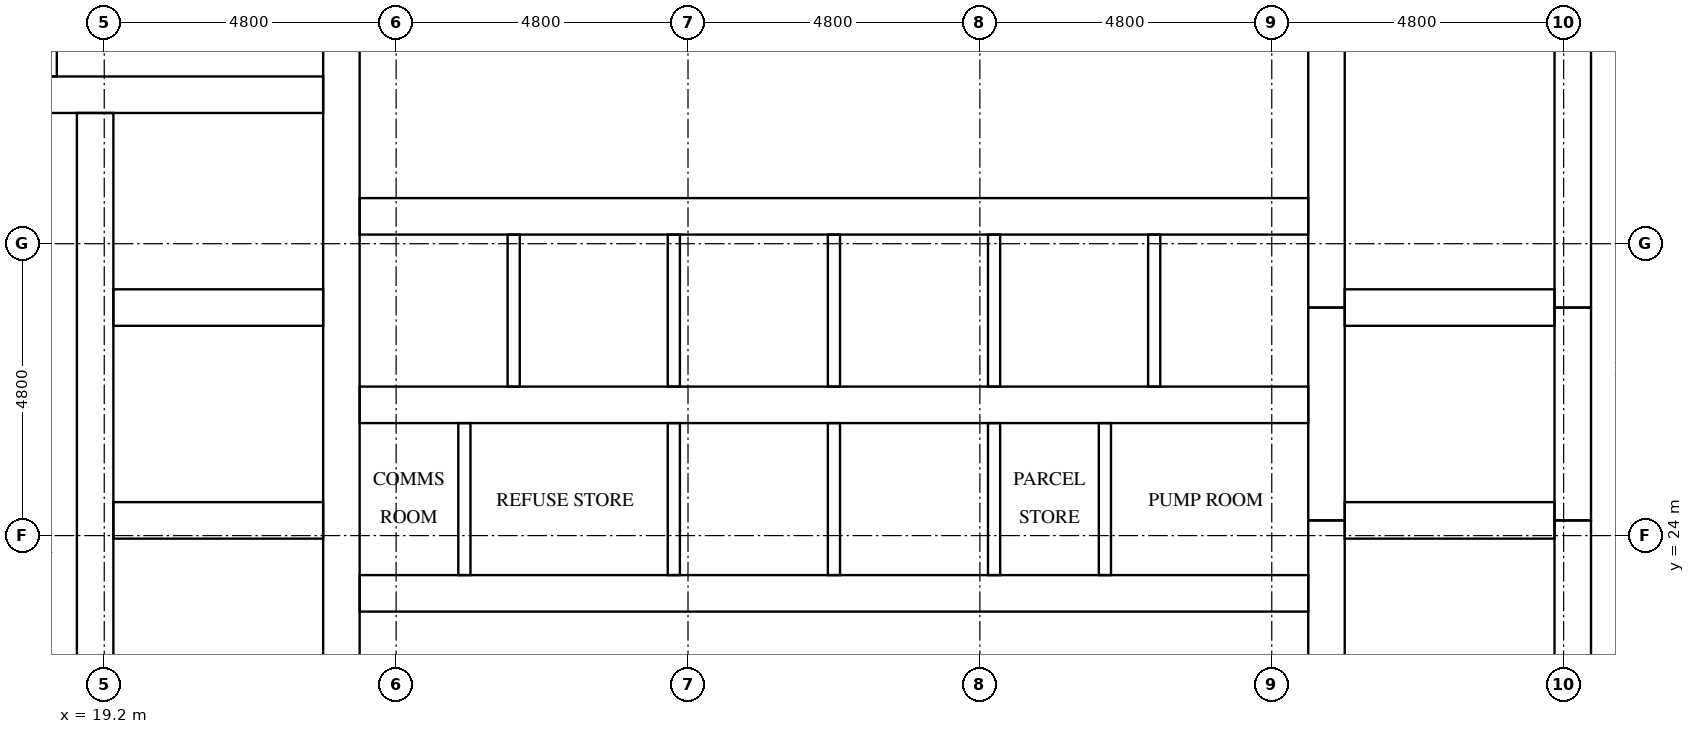
"""IFC4 building model, lengths in metres.
Left out: names, types, materials, properties, quantities, classifications, styles, units other than length and angle.
Written with IfcOpenShell. Run it as: python <this file> out.ifc"""

import sys

from ifc_helpers import new_model, si_unit, direction, frame, frame_2d, origin, place, context, subcontext, project, spatial, rectangle, extrude, element, fill, save


model = new_model("IFC4")
c1 = context("Model", 3, precision=1e-05, world=origin(), true_north=direction((0.0, 1.0)))
c2 = subcontext(c1, "Body", "Model", "MODEL_VIEW")
j1 = project(units=[si_unit("LENGTHUNIT", "METRE"), si_unit("PLANEANGLEUNIT", "RADIAN")], contexts=[c1])
p1 = place(None, origin())
s1 = spatial("IfcSite", under=j1, at=p1, CompositionType="ELEMENT")
p2 = place(p1, origin())
s2 = spatial("IfcBuilding", under=s1, at=p2, CompositionType="ELEMENT")
p3 = place(p2, frame((0.0, 0.0, 166.5)))
s3 = spatial("IfcBuildingStorey", under=s2, at=p3, CompositionType="ELEMENT", Elevation=166.5)
p4 = place(p3, frame((19.05, 15.8, 0.0), z_axis=(0.0, 0.0, 1.0), x_axis=(0.0, 1.0, 0.0)))
e1 = element("IfcWall", 1, at=p4, inside=s3, PredefinedType="SHEAR", context=c2, shape_type="SweptSolid", body=[
    extrude(rectangle(XDim=15.15, YDim=0.6, at=frame_2d((7.575, 0.0))), origin(), (0.0, 0.0, 1.0), 3.2),
])
p5 = place(p4, frame((9.65, 0.0, 0.0)))
e2 = element("IfcOpeningElement", 2, at=p5, cuts=e1, PredefinedType="OPENING", context=c2, shape_type="SweptSolid", body=[
    extrude(rectangle(XDim=1.1, YDim=2.1, at=frame_2d((0.55, 1.05))), frame((0.0, 0.31, 0.0), z_axis=(0.0, -1.0, 0.0), x_axis=(1.0, 0.0, 0.0)), (0.0, 0.0, 1.0), 0.62),
])
p6 = place(p4, frame((13.15, 0.0, 0.0)))
e3 = element("IfcOpeningElement", 3, at=p6, cuts=e1, PredefinedType="OPENING", context=c2, shape_type="SweptSolid", body=[
    extrude(rectangle(XDim=1.1, YDim=2.1, at=frame_2d((0.55, 1.05))), frame((0.0, 0.31, 0.0), z_axis=(0.0, -1.0, 0.0), x_axis=(1.0, 0.0, 0.0)), (0.0, 0.0, 1.0), 0.62),
])
p7 = place(p4, frame((0.4, 0.0, 0.0)))
e4 = element("IfcOpeningElement", 4, at=p7, cuts=e1, PredefinedType="OPENING", context=c2, shape_type="SweptSolid", body=[
    extrude(rectangle(XDim=1.2, YDim=2.1, at=frame_2d((0.6, 1.05))), frame((0.0, 0.31, 0.0), z_axis=(0.0, -1.0, 0.0), x_axis=(1.0, 0.0, 0.0)), (0.0, 0.0, 1.0), 0.62),
])
p8 = place(p3, frame((23.1, 15.8, 0.0), z_axis=(0.0, 0.0, 1.0), x_axis=(0.0, 1.0, 0.0)))
e5 = element("IfcWall", 5, at=p8, inside=s3, PredefinedType="SHEAR", context=c2, shape_type="SweptSolid", body=[
    extrude(rectangle(XDim=21.2, YDim=0.6, at=frame_2d((10.6, 0.0))), origin(), (0.0, 0.0, 1.0), 3.2),
])
p9 = place(p3, frame((39.3, 15.8, 0.0), z_axis=(0.0, 0.0, 1.0), x_axis=(0.0, 1.0, 0.0)))
e6 = element("IfcWall", 6, at=p9, inside=s3, PredefinedType="SHEAR", context=c2, shape_type="SweptSolid", body=[
    extrude(rectangle(XDim=8.45, YDim=0.6, at=frame_2d((4.225, 0.0))), origin(), (0.0, 0.0, 1.0), 3.2),
])
p10 = place(p3, frame((39.3, 24.25, 0.0), z_axis=(0.0, 0.0, 1.0), x_axis=(0.0, 1.0, 0.0)))
e7 = element("IfcWall", 7, at=p10, inside=s3, PredefinedType="SHEAR", context=c2, shape_type="SweptSolid", body=[
    extrude(rectangle(XDim=3.5, YDim=0.6, at=frame_2d((1.75, 0.0))), origin(), (0.0, 0.0, 1.0), 3.2),
])
p11 = place(p3, frame((39.3, 27.75, 0.0), z_axis=(0.0, 0.0, 1.0), x_axis=(0.0, 1.0, 0.0)))
e8 = element("IfcWall", 8, at=p11, inside=s3, PredefinedType="SHEAR", context=c2, shape_type="SweptSolid", body=[
    extrude(rectangle(XDim=9.25, YDim=0.6, at=frame_2d((4.625, 0.0))), origin(), (0.0, 0.0, 1.0), 3.2),
])
p12 = place(p3, frame((43.35, 15.8, 0.0), z_axis=(0.0, 0.0, 1.0), x_axis=(0.0, 1.0, 0.0)))
e9 = element("IfcWall", 9, at=p12, inside=s3, PredefinedType="SHEAR", context=c2, shape_type="SweptSolid", body=[
    extrude(rectangle(XDim=8.45, YDim=0.6, at=frame_2d((4.225, 0.0))), origin(), (0.0, 0.0, 1.0), 3.2),
])
p13 = place(p12, frame((0.4, 0.0, 0.0)))
e10 = element("IfcOpeningElement", 10, at=p13, cuts=e9, PredefinedType="OPENING", context=c2, shape_type="SweptSolid", body=[
    extrude(rectangle(XDim=1.2, YDim=2.1, at=frame_2d((0.6, 1.05))), frame((0.0, 0.31, 0.0), z_axis=(0.0, -1.0, 0.0), x_axis=(1.0, 0.0, 0.0)), (0.0, 0.0, 1.0), 0.62),
])
p14 = place(p3, frame((43.35, 24.25, 0.0), z_axis=(0.0, 0.0, 1.0), x_axis=(0.0, 1.0, 0.0)))
e11 = element("IfcWall", 11, at=p14, inside=s3, PredefinedType="SHEAR", context=c2, shape_type="SweptSolid", body=[
    extrude(rectangle(XDim=3.5, YDim=0.6, at=frame_2d((1.75, 0.0))), origin(), (0.0, 0.0, 1.0), 3.2),
])
p15 = place(p14, frame((1.2, 0.0, 0.0)))
e12 = element("IfcOpeningElement", 12, at=p15, cuts=e11, PredefinedType="OPENING", context=c2, shape_type="SweptSolid", body=[
    extrude(rectangle(XDim=1.1, YDim=2.1, at=frame_2d((0.55, 1.05))), frame((0.0, 0.31, 0.0), z_axis=(0.0, -1.0, 0.0), x_axis=(1.0, 0.0, 0.0)), (0.0, 0.0, 1.0), 0.62),
])
p16 = place(p3, frame((43.35, 27.75, 0.0), z_axis=(0.0, 0.0, 1.0), x_axis=(0.0, 1.0, 0.0)))
e13 = element("IfcWall", 13, at=p16, inside=s3, PredefinedType="SHEAR", context=c2, shape_type="SweptSolid", body=[
    extrude(rectangle(XDim=9.25, YDim=0.6, at=frame_2d((4.625, 0.0))), origin(), (0.0, 0.0, 1.0), 3.2),
])
p17 = place(p16, frame((7.65, 0.0, 0.0)))
e14 = element("IfcOpeningElement", 14, at=p17, cuts=e13, PredefinedType="OPENING", context=c2, shape_type="SweptSolid", body=[
    extrude(rectangle(XDim=1.2, YDim=2.1, at=frame_2d((0.6, 1.05))), frame((0.0, 0.31, 0.0), z_axis=(0.0, -1.0, 0.0), x_axis=(1.0, 0.0, 0.0)), (0.0, 0.0, 1.0), 0.62),
])
for number, where, z_axis, x_axis in (
    (15, (19.35, 24.25, 0.0), (0.0, 0.0, 1.0), (1.0, 0.0, 0.0)),
    (16, (19.35, 27.75, 0.0), (0.0, 0.0, 1.0), (1.0, 0.0, 0.0)),
):
    element("IfcWall", number, at=place(p3, frame(where, z_axis=z_axis, x_axis=x_axis)), inside=s3, PredefinedType="SHEAR", context=c2, shape_type="SweptSolid", body=[
        extrude(rectangle(XDim=3.45, YDim=0.6, at=frame_2d((1.725, 0.0))), origin(), (0.0, 0.0, 1.0), 3.2),
    ])
p18 = place(p3, frame((15.8, 31.25, 0.0), z_axis=(0.0, 0.0, 1.0), x_axis=(1.0, 0.0, 0.0)))
e17 = element("IfcWall", 17, at=p18, inside=s3, PredefinedType="SHEAR", context=c2, shape_type="SweptSolid", body=[
    extrude(rectangle(XDim=7.0, YDim=0.6, at=frame_2d((3.5, 0.0))), origin(), (0.0, 0.0, 1.0), 3.2),
])
for number, where, z_axis, x_axis in (
    (18, (39.6, 24.25, 0.0), (0.0, 0.0, 1.0), (1.0, 0.0, 0.0)),
    (19, (39.6, 27.75, 0.0), (0.0, 0.0, 1.0), (1.0, 0.0, 0.0)),
):
    element("IfcWall", number, at=place(p3, frame(where, z_axis=z_axis, x_axis=x_axis)), inside=s3, PredefinedType="SHEAR", context=c2, shape_type="SweptSolid", body=[
        extrude(rectangle(XDim=3.45, YDim=0.6, at=frame_2d((1.725, 0.0))), origin(), (0.0, 0.0, 1.0), 3.2),
    ])
p19 = place(p3, frame((23.4, 23.05, 0.0), z_axis=(0.0, 0.0, 1.0), x_axis=(1.0, 0.0, 0.0)))
e20 = element("IfcWall", 20, at=p19, inside=s3, PredefinedType="SHEAR", context=c2, shape_type="SweptSolid", body=[
    extrude(rectangle(XDim=15.6, YDim=0.6, at=frame_2d((7.8, 0.0))), origin(), (0.0, 0.0, 1.0), 3.2),
])
p20 = place(p19, frame((0.311, 0.0, 0.0)))
e21 = element("IfcOpeningElement", 21, at=p20, cuts=e20, PredefinedType="OPENING", context=c2, shape_type="SweptSolid", body=[
    extrude(rectangle(XDim=1.0, YDim=2.1, at=frame_2d((0.5, 1.05))), frame((0.0, 0.31, 0.0), z_axis=(0.0, -1.0, 0.0), x_axis=(1.0, 0.0, 0.0)), (0.0, 0.0, 1.0), 0.62),
])
p21 = place(p19, frame((2.945, 0.0, 0.0)))
e22 = element("IfcOpeningElement", 22, at=p21, cuts=e20, PredefinedType="OPENING", context=c2, shape_type="SweptSolid", body=[
    extrude(rectangle(XDim=1.0, YDim=2.1, at=frame_2d((0.5, 1.05))), frame((0.0, 0.31, 0.0), z_axis=(0.0, -1.0, 0.0), x_axis=(1.0, 0.0, 0.0)), (0.0, 0.0, 1.0), 0.62),
])
p22 = place(p19, frame((10.845, 0.0, 0.0)))
e23 = element("IfcOpeningElement", 23, at=p22, cuts=e20, PredefinedType="OPENING", context=c2, shape_type="SweptSolid", body=[
    extrude(rectangle(XDim=1.0, YDim=2.1, at=frame_2d((0.5, 1.05))), frame((0.0, 0.31, 0.0), z_axis=(0.0, -1.0, 0.0), x_axis=(1.0, 0.0, 0.0)), (0.0, 0.0, 1.0), 0.62),
])
p23 = place(p19, frame((13.478, 0.0, 0.0)))
e24 = element("IfcOpeningElement", 24, at=p23, cuts=e20, PredefinedType="OPENING", context=c2, shape_type="SweptSolid", body=[
    extrude(rectangle(XDim=1.0, YDim=2.1, at=frame_2d((0.5, 1.05))), frame((0.0, 0.31, 0.0), z_axis=(0.0, -1.0, 0.0), x_axis=(1.0, 0.0, 0.0)), (0.0, 0.0, 1.0), 0.62),
])
p24 = place(p3, frame((23.4, 26.15, 0.0), z_axis=(0.0, 0.0, 1.0), x_axis=(1.0, 0.0, 0.0)))
e25 = element("IfcWall", 25, at=p24, inside=s3, PredefinedType="SHEAR", context=c2, shape_type="SweptSolid", body=[
    extrude(rectangle(XDim=15.6, YDim=0.6, at=frame_2d((7.8, 0.0))), origin(), (0.0, 0.0, 1.0), 3.2),
])
p25 = place(p3, frame((23.4, 29.25, 0.0), z_axis=(0.0, 0.0, 1.0), x_axis=(1.0, 0.0, 0.0)))
e26 = element("IfcWall", 26, at=p25, inside=s3, PredefinedType="SHEAR", context=c2, shape_type="SweptSolid", body=[
    extrude(rectangle(XDim=15.6, YDim=0.6, at=frame_2d((7.8, 0.0))), origin(), (0.0, 0.0, 1.0), 3.2),
])
p26 = place(p25, frame((0.667, 0.0, 0.0)))
e27 = element("IfcOpeningElement", 27, at=p26, cuts=e26, PredefinedType="OPENING", context=c2, shape_type="SweptSolid", body=[
    extrude(rectangle(XDim=1.1, YDim=2.1, at=frame_2d((0.55, 1.05))), frame((0.0, 0.31, 0.0), z_axis=(0.0, -1.0, 0.0), x_axis=(1.0, 0.0, 0.0)), (0.0, 0.0, 1.0), 0.62),
])
p27 = place(p25, frame((3.3, 0.0, 0.0)))
e28 = element("IfcOpeningElement", 28, at=p27, cuts=e26, PredefinedType="OPENING", context=c2, shape_type="SweptSolid", body=[
    extrude(rectangle(XDim=1.1, YDim=2.1, at=frame_2d((0.55, 1.05))), frame((0.0, 0.31, 0.0), z_axis=(0.0, -1.0, 0.0), x_axis=(1.0, 0.0, 0.0)), (0.0, 0.0, 1.0), 0.62),
])
p28 = place(p25, frame((5.933, 0.0, 0.0)))
e29 = element("IfcOpeningElement", 29, at=p28, cuts=e26, PredefinedType="OPENING", context=c2, shape_type="SweptSolid", body=[
    extrude(rectangle(XDim=1.1, YDim=2.1, at=frame_2d((0.55, 1.05))), frame((0.0, 0.31, 0.0), z_axis=(0.0, -1.0, 0.0), x_axis=(1.0, 0.0, 0.0)), (0.0, 0.0, 1.0), 0.62),
])
p29 = place(p25, frame((8.567, 0.0, 0.0)))
e30 = element("IfcOpeningElement", 30, at=p29, cuts=e26, PredefinedType="OPENING", context=c2, shape_type="SweptSolid", body=[
    extrude(rectangle(XDim=1.1, YDim=2.1, at=frame_2d((0.55, 1.05))), frame((0.0, 0.31, 0.0), z_axis=(0.0, -1.0, 0.0), x_axis=(1.0, 0.0, 0.0)), (0.0, 0.0, 1.0), 0.62),
])
p30 = place(p25, frame((11.2, 0.0, 0.0)))
e31 = element("IfcOpeningElement", 31, at=p30, cuts=e26, PredefinedType="OPENING", context=c2, shape_type="SweptSolid", body=[
    extrude(rectangle(XDim=1.1, YDim=2.1, at=frame_2d((0.55, 1.05))), frame((0.0, 0.31, 0.0), z_axis=(0.0, -1.0, 0.0), x_axis=(1.0, 0.0, 0.0)), (0.0, 0.0, 1.0), 0.62),
])
p31 = place(p25, frame((13.833, 0.0, 0.0)))
e32 = element("IfcOpeningElement", 32, at=p31, cuts=e26, PredefinedType="OPENING", context=c2, shape_type="SweptSolid", body=[
    extrude(rectangle(XDim=1.1, YDim=2.1, at=frame_2d((0.55, 1.05))), frame((0.0, 0.31, 0.0), z_axis=(0.0, -1.0, 0.0), x_axis=(1.0, 0.0, 0.0)), (0.0, 0.0, 1.0), 0.62),
])
for number, where, z_axis, x_axis in (
    (33, (25.933, 26.45, 0.0), (0.0, 0.0, 1.0), (0.0, 1.0, 0.0)),
    (34, (28.567, 23.35, 0.0), (0.0, 0.0, 1.0), (0.0, 1.0, 0.0)),
    (35, (28.567, 26.45, 0.0), (0.0, 0.0, 1.0), (0.0, 1.0, 0.0)),
    (36, (31.2, 23.35, 0.0), (0.0, 0.0, 1.0), (0.0, 1.0, 0.0)),
    (37, (31.2, 26.45, 0.0), (0.0, 0.0, 1.0), (0.0, 1.0, 0.0)),
    (38, (33.833, 23.35, 0.0), (0.0, 0.0, 1.0), (0.0, 1.0, 0.0)),
    (39, (33.833, 26.45, 0.0), (0.0, 0.0, 1.0), (0.0, 1.0, 0.0)),
    (40, (36.467, 26.45, 0.0), (0.0, 0.0, 1.0), (0.0, 1.0, 0.0)),
):
    element("IfcWall", number, at=place(p3, frame(where, z_axis=z_axis, x_axis=x_axis)), inside=s3, PredefinedType="SOLIDWALL", context=c2, shape_type="SweptSolid", body=[
        extrude(rectangle(XDim=2.5, YDim=0.2, at=frame_2d((1.25, 0.0))), origin(), (0.0, 0.0, 1.0), 3.2),
    ])
p32 = place(p3, frame((18.32, 31.55, 0.0), z_axis=(0.0, 0.0, 1.0), x_axis=(0.0, 1.0, 0.0)))
e41 = element("IfcWall", 41, at=p32, inside=s3, PredefinedType="PARTITIONING", context=c2, shape_type="SweptSolid", body=[
    extrude(rectangle(XDim=5.45, YDim=0.2, at=frame_2d((2.725, 0.0))), origin(), (0.0, 0.0, 1.0), 3.2),
])
for number, where, z_axis, x_axis in (
    (42, (25.123, 23.35, 0.0), (0.0, 0.0, 1.0), (0.0, 1.0, 0.0)),
    (43, (35.656, 23.35, 0.0), (0.0, 0.0, 1.0), (0.0, 1.0, 0.0)),
):
    element("IfcWall", number, at=place(p3, frame(where, z_axis=z_axis, x_axis=x_axis)), inside=s3, PredefinedType="PARTITIONING", context=c2, shape_type="SweptSolid", body=[
        extrude(rectangle(XDim=2.5, YDim=0.2, at=frame_2d((1.25, 0.0))), origin(), (0.0, 0.0, 1.0), 3.2),
    ])
p33 = place(p26, origin())
e44 = element("IfcDoor", 44, at=p33, inside=s3, OperationType="DOUBLE_DOOR_SLIDING", PredefinedType="DOOR", context=c2, shape_type="SweptSolid", body=[
    extrude(rectangle(XDim=1.1, YDim=2.1, at=frame_2d((0.55, 1.05))), frame((0.0, 0.025, 0.0), z_axis=(0.0, -1.0, 0.0), x_axis=(1.0, 0.0, 0.0)), (0.0, 0.0, 1.0), 0.05),
])
fill(e27, e44)
p34 = place(p27, origin())
e45 = element("IfcDoor", 45, at=p34, inside=s3, OperationType="DOUBLE_DOOR_SLIDING", PredefinedType="DOOR", context=c2, shape_type="SweptSolid", body=[
    extrude(rectangle(XDim=1.1, YDim=2.1, at=frame_2d((0.55, 1.05))), frame((0.0, 0.025, 0.0), z_axis=(0.0, -1.0, 0.0), x_axis=(1.0, 0.0, 0.0)), (0.0, 0.0, 1.0), 0.05),
])
fill(e28, e45)
p35 = place(p28, origin())
e46 = element("IfcDoor", 46, at=p35, inside=s3, OperationType="DOUBLE_DOOR_SLIDING", PredefinedType="DOOR", context=c2, shape_type="SweptSolid", body=[
    extrude(rectangle(XDim=1.1, YDim=2.1, at=frame_2d((0.55, 1.05))), frame((0.0, 0.025, 0.0), z_axis=(0.0, -1.0, 0.0), x_axis=(1.0, 0.0, 0.0)), (0.0, 0.0, 1.0), 0.05),
])
fill(e29, e46)
p36 = place(p29, origin())
e47 = element("IfcDoor", 47, at=p36, inside=s3, OperationType="DOUBLE_DOOR_SLIDING", PredefinedType="DOOR", context=c2, shape_type="SweptSolid", body=[
    extrude(rectangle(XDim=1.1, YDim=2.1, at=frame_2d((0.55, 1.05))), frame((0.0, 0.025, 0.0), z_axis=(0.0, -1.0, 0.0), x_axis=(1.0, 0.0, 0.0)), (0.0, 0.0, 1.0), 0.05),
])
fill(e30, e47)
p37 = place(p30, origin())
e48 = element("IfcDoor", 48, at=p37, inside=s3, OperationType="DOUBLE_DOOR_SLIDING", PredefinedType="DOOR", context=c2, shape_type="SweptSolid", body=[
    extrude(rectangle(XDim=1.1, YDim=2.1, at=frame_2d((0.55, 1.05))), frame((0.0, 0.025, 0.0), z_axis=(0.0, -1.0, 0.0), x_axis=(1.0, 0.0, 0.0)), (0.0, 0.0, 1.0), 0.05),
])
fill(e31, e48)
p38 = place(p31, origin())
e49 = element("IfcDoor", 49, at=p38, inside=s3, OperationType="DOUBLE_DOOR_SLIDING", PredefinedType="DOOR", context=c2, shape_type="SweptSolid", body=[
    extrude(rectangle(XDim=1.1, YDim=2.1, at=frame_2d((0.55, 1.05))), frame((0.0, 0.025, 0.0), z_axis=(0.0, -1.0, 0.0), x_axis=(1.0, 0.0, 0.0)), (0.0, 0.0, 1.0), 0.05),
])
fill(e32, e49)
p39 = place(p5, origin())
e50 = element("IfcDoor", 50, at=p39, inside=s3, OperationType="DOUBLE_DOOR_SLIDING", PredefinedType="DOOR", context=c2, shape_type="SweptSolid", body=[
    extrude(rectangle(XDim=1.1, YDim=2.1, at=frame_2d((0.55, 1.05))), frame((0.0, 0.025, 0.0), z_axis=(0.0, -1.0, 0.0), x_axis=(1.0, 0.0, 0.0)), (0.0, 0.0, 1.0), 0.05),
])
fill(e2, e50)
p40 = place(p6, origin())
e51 = element("IfcDoor", 51, at=p40, inside=s3, OperationType="DOUBLE_DOOR_SLIDING", PredefinedType="DOOR", context=c2, shape_type="SweptSolid", body=[
    extrude(rectangle(XDim=1.1, YDim=2.1, at=frame_2d((0.55, 1.05))), frame((0.0, 0.025, 0.0), z_axis=(0.0, -1.0, 0.0), x_axis=(1.0, 0.0, 0.0)), (0.0, 0.0, 1.0), 0.05),
])
fill(e3, e51)
p41 = place(p15, origin())
e52 = element("IfcDoor", 52, at=p41, inside=s3, OperationType="DOUBLE_DOOR_SLIDING", PredefinedType="DOOR", context=c2, shape_type="SweptSolid", body=[
    extrude(rectangle(XDim=1.1, YDim=2.1, at=frame_2d((0.55, 1.05))), frame((0.0, 0.025, 0.0), z_axis=(0.0, -1.0, 0.0), x_axis=(1.0, 0.0, 0.0)), (0.0, 0.0, 1.0), 0.05),
])
fill(e12, e52)
p42 = place(p20, frame((1.0, 0.0, 0.0), z_axis=(0.0, 0.0, 1.0), x_axis=(-1.0, 0.0, 0.0)))
e53 = element("IfcDoor", 53, at=p42, inside=s3, OperationType="SINGLE_SWING_RIGHT", PredefinedType="DOOR", context=c2, shape_type="SweptSolid", body=[
    extrude(rectangle(XDim=1.0, YDim=2.1, at=frame_2d((0.5, 1.05))), frame((0.0, 0.025, 0.0), z_axis=(0.0, -1.0, 0.0), x_axis=(1.0, 0.0, 0.0)), (0.0, 0.0, 1.0), 0.05),
])
fill(e21, e53)
p43 = place(p21, frame((1.0, 0.0, 0.0), z_axis=(0.0, 0.0, 1.0), x_axis=(-1.0, 0.0, 0.0)))
e54 = element("IfcDoor", 54, at=p43, inside=s3, OperationType="SINGLE_SWING_LEFT", PredefinedType="DOOR", context=c2, shape_type="SweptSolid", body=[
    extrude(rectangle(XDim=1.0, YDim=2.1, at=frame_2d((0.5, 1.05))), frame((0.0, 0.025, 0.0), z_axis=(0.0, -1.0, 0.0), x_axis=(1.0, 0.0, 0.0)), (0.0, 0.0, 1.0), 0.05),
])
fill(e22, e54)
p44 = place(p22, frame((1.0, 0.0, 0.0), z_axis=(0.0, 0.0, 1.0), x_axis=(-1.0, 0.0, 0.0)))
e55 = element("IfcDoor", 55, at=p44, inside=s3, OperationType="SINGLE_SWING_RIGHT", PredefinedType="DOOR", context=c2, shape_type="SweptSolid", body=[
    extrude(rectangle(XDim=1.0, YDim=2.1, at=frame_2d((0.5, 1.05))), frame((0.0, 0.025, 0.0), z_axis=(0.0, -1.0, 0.0), x_axis=(1.0, 0.0, 0.0)), (0.0, 0.0, 1.0), 0.05),
])
fill(e23, e55)
p45 = place(p23, frame((1.0, 0.0, 0.0), z_axis=(0.0, 0.0, 1.0), x_axis=(-1.0, 0.0, 0.0)))
e56 = element("IfcDoor", 56, at=p45, inside=s3, OperationType="SINGLE_SWING_LEFT", PredefinedType="DOOR", context=c2, shape_type="SweptSolid", body=[
    extrude(rectangle(XDim=1.0, YDim=2.1, at=frame_2d((0.5, 1.05))), frame((0.0, 0.025, 0.0), z_axis=(0.0, -1.0, 0.0), x_axis=(1.0, 0.0, 0.0)), (0.0, 0.0, 1.0), 0.05),
])
fill(e24, e56)
save(model, sys.argv[1])
